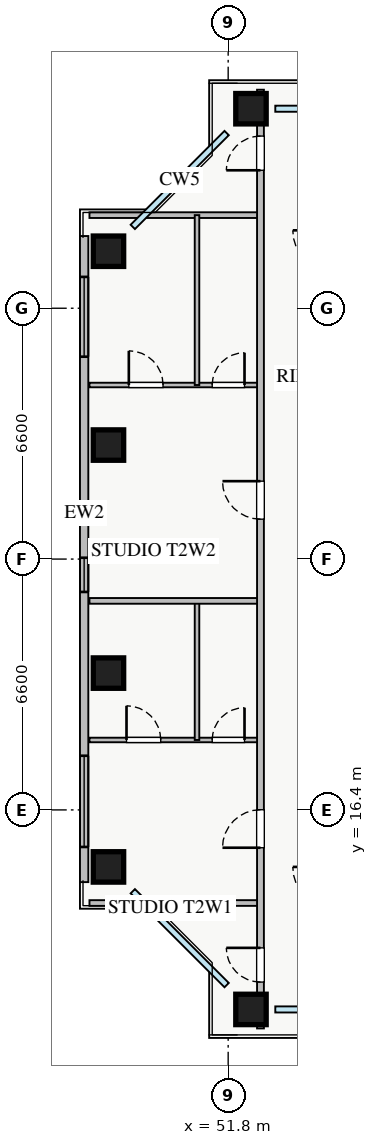
"""IFC4 building model, lengths in metres.
Left out: names, types, materials, properties, quantities, classifications, styles, units other than length and angle.
Written with IfcOpenShell. Run it as: python <this file> out.ifc"""

import sys

from ifc_helpers import new_model, si_unit, direction, frame, frame_2d, origin, origin_2d, place, context, subcontext, project, spatial, rectangle, extrude, source, transform, mapped, element, fill, save


model = new_model("IFC4")
c1 = context("Model", 3, precision=1e-05, world=origin(), true_north=direction((0.0, 1.0)))
c2 = subcontext(c1, "Body", "Model", "MODEL_VIEW")
j1 = project(units=[si_unit("LENGTHUNIT", "METRE"), si_unit("PLANEANGLEUNIT", "RADIAN")], contexts=[c1])
p1 = place(None, origin())
s1 = spatial("IfcSite", under=j1, at=p1, CompositionType="ELEMENT")
p2 = place(p1, origin())
s2 = spatial("IfcBuilding", under=s1, at=p2, CompositionType="ELEMENT")
p3 = place(p2, frame((0.0, 0.0, 82.75)))
s3 = spatial("IfcBuildingStorey", under=s2, at=p3, CompositionType="ELEMENT", Elevation=82.75)
m1 = source(origin(), c2, "Body", "SweptSolid", [
    extrude(rectangle(XDim=0.8, YDim=0.8, at=origin_2d()), origin(), (0.0, 0.0, 1.0), 3.25),
])
for number, where, z_axis, x_axis in (
    (1, (52.4, 11.15, 0.0), (0.0, 0.0, 1.0), (1.0, 0.0, 0.0)),
    (2, (52.4, 34.85, 0.0), (0.0, 0.0, 1.0), (1.0, 0.0, 0.0)),
    (3, (48.65, 14.9, 0.0), (0.0, 0.0, 1.0), (1.0, 0.0, 0.0)),
    (4, (48.65, 20.0, 0.0), (0.0, 0.0, 1.0), (1.0, 0.0, 0.0)),
    (5, (48.65, 26.0, 0.0), (0.0, 0.0, 1.0), (1.0, 0.0, 0.0)),
    (6, (48.65, 31.1, 0.0), (0.0, 0.0, 1.0), (1.0, 0.0, 0.0)),
):
    element("IfcColumn", number, at=place(p3, frame(where, z_axis=z_axis, x_axis=x_axis)), inside=s3, PredefinedType="COLUMN", context=c2, shape_type="MappedRepresentation", body=[
        mapped(m1, transform((0.0, 0.0, 0.0), x_axis=(1.0, 0.0, 0.0), y_axis=(0.0, 1.0, 0.0), z_axis=(0.0, 0.0, 1.0), scale=1.0)),
    ])
p4 = place(p3, frame((48.01, 14.5, 0.0), z_axis=(0.0, 0.0, 1.0), x_axis=(0.0, 1.0, 0.0)))
e7 = element("IfcWall", 7, at=p4, inside=s3, PredefinedType="STANDARD", context=c2, shape_type="SweptSolid", body=[
    extrude(rectangle(XDim=17.0, YDim=0.22, at=frame_2d((8.5, 0.0))), origin(), (0.0, 0.0, 1.0), 2.61),
])
p5 = place(p4, frame((0.925, 0.0, 0.9)))
e8 = element("IfcOpeningElement", 8, at=p5, cuts=e7, PredefinedType="OPENING", context=c2, shape_type="SweptSolid", body=[
    extrude(rectangle(XDim=2.4, YDim=1.48, at=frame_2d((1.2, 0.74))), frame((0.0, 0.12, 0.0), z_axis=(0.0, -1.0, 0.0), x_axis=(1.0, 0.0, 0.0)), (0.0, 0.0, 1.0), 0.24),
])
p6 = place(p4, frame((13.825, 0.0, 0.9)))
e9 = element("IfcOpeningElement", 9, at=p6, cuts=e7, PredefinedType="OPENING", context=c2, shape_type="SweptSolid", body=[
    extrude(rectangle(XDim=2.1, YDim=1.48, at=frame_2d((1.05, 0.74))), frame((0.0, 0.12, 0.0), z_axis=(0.0, -1.0, 0.0), x_axis=(1.0, 0.0, 0.0)), (0.0, 0.0, 1.0), 0.24),
])
p7 = place(p4, frame((7.635, 0.0, 0.9)))
e10 = element("IfcOpeningElement", 10, at=p7, cuts=e7, PredefinedType="OPENING", context=c2, shape_type="SweptSolid", body=[
    extrude(rectangle(XDim=0.9, YDim=1.2, at=frame_2d((0.45, 0.6))), frame((0.0, 0.12, 0.0), z_axis=(0.0, -1.0, 0.0), x_axis=(1.0, 0.0, 0.0)), (0.0, 0.0, 1.0), 0.24),
])
for number, where, z_axis, x_axis in (
    (11, (48.15, 32.05, 0.0), (0.0, 0.0, 1.0), (1.0, 0.0, 0.0)),
    (12, (48.15, 13.95, 0.0), (0.0, 0.0, 1.0), (1.0, 0.0, 0.0)),
):
    element("IfcWall", number, at=place(p3, frame(where, z_axis=z_axis, x_axis=x_axis)), inside=s3, PredefinedType="PARTITIONING", context=c2, shape_type="SweptSolid", body=[
        extrude(rectangle(XDim=4.5, YDim=0.15, at=frame_2d((2.25, 0.0))), origin(), (0.0, 0.0, 1.0), 3.07),
    ])
p8 = place(p3, frame((48.15, 18.24, 0.0), z_axis=(0.0, 0.0, 1.0), x_axis=(1.0, 0.0, 0.0)))
e13 = element("IfcWall", 13, at=p8, inside=s3, PredefinedType="PLUMBINGWALL", context=c2, shape_type="SweptSolid", body=[
    extrude(rectangle(XDim=4.5, YDim=0.12, at=frame_2d((2.25, 0.0))), origin(), (0.0, 0.0, 1.0), 3.07),
])
p9 = place(p8, frame((0.975, 0.0, 0.0)))
e14 = element("IfcOpeningElement", 14, at=p9, cuts=e13, PredefinedType="OPENING", context=c2, shape_type="SweptSolid", body=[
    extrude(rectangle(XDim=0.9, YDim=2.05, at=frame_2d((0.45, 1.025))), frame((0.0, 0.07, 0.0), z_axis=(0.0, -1.0, 0.0), x_axis=(1.0, 0.0, 0.0)), (0.0, 0.0, 1.0), 0.14),
])
p10 = place(p8, frame((3.23, 0.0, 0.0)))
e15 = element("IfcOpeningElement", 15, at=p10, cuts=e13, PredefinedType="OPENING", context=c2, shape_type="SweptSolid", body=[
    extrude(rectangle(XDim=0.85, YDim=2.05, at=frame_2d((0.425, 1.025))), frame((0.0, 0.07, 0.0), z_axis=(0.0, -1.0, 0.0), x_axis=(1.0, 0.0, 0.0)), (0.0, 0.0, 1.0), 0.14),
])
p11 = place(p3, frame((50.98, 18.24, 0.0), z_axis=(0.0, 0.0, 1.0), x_axis=(0.0, 1.0, 0.0)))
e16 = element("IfcWall", 16, at=p11, inside=s3, PredefinedType="PLUMBINGWALL", context=c2, shape_type="SweptSolid", body=[
    extrude(rectangle(XDim=3.66, YDim=0.12, at=frame_2d((1.83, 0.0))), origin(), (0.0, 0.0, 1.0), 3.07),
])
p12 = place(p3, frame((48.15, 27.58, 0.0), z_axis=(0.0, 0.0, 1.0), x_axis=(1.0, 0.0, 0.0)))
e17 = element("IfcWall", 17, at=p12, inside=s3, PredefinedType="PLUMBINGWALL", context=c2, shape_type="SweptSolid", body=[
    extrude(rectangle(XDim=4.5, YDim=0.12, at=frame_2d((2.25, 0.0))), origin(), (0.0, 0.0, 1.0), 2.771),
])
p13 = place(p12, frame((1.036, 0.0, 0.0)))
e18 = element("IfcOpeningElement", 18, at=p13, cuts=e17, PredefinedType="OPENING", context=c2, shape_type="SweptSolid", body=[
    extrude(rectangle(XDim=0.9, YDim=2.05, at=frame_2d((0.45, 1.025))), frame((0.0, 0.07, 0.0), z_axis=(0.0, -1.0, 0.0), x_axis=(1.0, 0.0, 0.0)), (0.0, 0.0, 1.0), 0.14),
])
p14 = place(p12, frame((3.23, 0.0, 0.0)))
e19 = element("IfcOpeningElement", 19, at=p14, cuts=e17, PredefinedType="OPENING", context=c2, shape_type="SweptSolid", body=[
    extrude(rectangle(XDim=0.85, YDim=2.05, at=frame_2d((0.425, 1.025))), frame((0.0, 0.07, 0.0), z_axis=(0.0, -1.0, 0.0), x_axis=(1.0, 0.0, 0.0)), (0.0, 0.0, 1.0), 0.14),
])
p15 = place(p3, frame((50.98, 27.58, 0.0), z_axis=(0.0, 0.0, 1.0), x_axis=(0.0, 1.0, 0.0)))
e20 = element("IfcWall", 20, at=p15, inside=s3, PredefinedType="PLUMBINGWALL", context=c2, shape_type="SweptSolid", body=[
    extrude(rectangle(XDim=4.47, YDim=0.12, at=frame_2d((2.235, 0.0))), origin(), (0.0, 0.0, 1.0), 3.07),
])
p16 = place(p3, frame((48.15, 21.9, 0.0), z_axis=(0.0, 0.0, 1.0), x_axis=(1.0, 0.0, 0.0)))
e21 = element("IfcWall", 21, at=p16, inside=s3, PredefinedType="PARTITIONING", context=c2, shape_type="SweptSolid", body=[
    extrude(rectangle(XDim=4.5, YDim=0.15, at=frame_2d((2.25, 0.0))), origin(), (0.0, 0.0, 1.0), 3.07),
])
p17 = place(p3, frame((52.65, 10.65, 0.0), z_axis=(0.0, 0.0, 1.0), x_axis=(0.0, 1.0, 0.0)))
e22 = element("IfcWall", 22, at=p17, inside=s3, PredefinedType="PARTITIONING", context=c2, shape_type="SweptSolid", body=[
    extrude(rectangle(XDim=24.7, YDim=0.18, at=frame_2d((12.35, 0.0))), origin(), (0.0, 0.0, 1.0), 2.615),
])
p18 = place(p17, frame((22.58, 0.0, 0.0)))
e23 = element("IfcOpeningElement", 23, at=p18, cuts=e22, PredefinedType="OPENING", context=c2, shape_type="SweptSolid", body=[
    extrude(rectangle(XDim=0.9, YDim=2.05, at=frame_2d((0.45, 1.025))), frame((0.0, 0.1, 0.0), z_axis=(0.0, -1.0, 0.0), x_axis=(1.0, 0.0, 0.0)), (0.0, 0.0, 1.0), 0.2),
])
p19 = place(p17, frame((1.22, 0.0, 0.0)))
e24 = element("IfcOpeningElement", 24, at=p19, cuts=e22, PredefinedType="OPENING", context=c2, shape_type="SweptSolid", body=[
    extrude(rectangle(XDim=0.9, YDim=2.05, at=frame_2d((0.45, 1.025))), frame((0.0, 0.1, 0.0), z_axis=(0.0, -1.0, 0.0), x_axis=(1.0, 0.0, 0.0)), (0.0, 0.0, 1.0), 0.2),
])
p20 = place(p17, frame((4.755, 0.0, 0.0)))
e25 = element("IfcOpeningElement", 25, at=p20, cuts=e22, PredefinedType="OPENING", context=c2, shape_type="SweptSolid", body=[
    extrude(rectangle(XDim=1.0, YDim=2.05, at=frame_2d((0.5, 1.025))), frame((0.0, 0.1, 0.0), z_axis=(0.0, -1.0, 0.0), x_axis=(1.0, 0.0, 0.0)), (0.0, 0.0, 1.0), 0.2),
])
p21 = place(p17, frame((13.4, 0.0, 0.0)))
e26 = element("IfcOpeningElement", 26, at=p21, cuts=e22, PredefinedType="OPENING", context=c2, shape_type="SweptSolid", body=[
    extrude(rectangle(XDim=1.0, YDim=2.05, at=frame_2d((0.5, 1.025))), frame((0.0, 0.1, 0.0), z_axis=(0.0, -1.0, 0.0), x_axis=(1.0, 0.0, 0.0)), (0.0, 0.0, 1.0), 0.2),
])
m2 = source(origin(), c2, "Body", "SweptSolid", [
    extrude(rectangle(XDim=2.4, YDim=1.48, at=frame_2d((1.2, 0.74))), frame((0.0, 0.03, 0.0), z_axis=(0.0, -1.0, 0.0), x_axis=(1.0, 0.0, 0.0)), (0.0, 0.0, 1.0), 0.06),
])
p22 = place(p5, origin())
e27 = element("IfcWindow", 27, at=p22, inside=s3, PartitioningType="TRIPLE_PANEL_VERTICAL", PredefinedType="WINDOW", context=c2, shape_type="MappedRepresentation", body=[
    mapped(m2, transform((0.0, 0.0, 0.0), x_axis=(1.0, 0.0, 0.0), y_axis=(0.0, 1.0, 0.0), z_axis=(0.0, 0.0, 1.0), scale=1.0)),
])
fill(e8, e27)
m3 = source(origin(), c2, "Body", "SweptSolid", [
    extrude(rectangle(XDim=2.1, YDim=1.48, at=frame_2d((1.05, 0.74))), frame((0.0, 0.03, 0.0), z_axis=(0.0, -1.0, 0.0), x_axis=(1.0, 0.0, 0.0)), (0.0, 0.0, 1.0), 0.06),
])
p23 = place(p6, origin())
e28 = element("IfcWindow", 28, at=p23, inside=s3, PartitioningType="TRIPLE_PANEL_VERTICAL", PredefinedType="WINDOW", context=c2, shape_type="MappedRepresentation", body=[
    mapped(m3, transform((0.0, 0.0, 0.0), x_axis=(1.0, 0.0, 0.0), y_axis=(0.0, 1.0, 0.0), z_axis=(0.0, 0.0, 1.0), scale=1.0)),
])
fill(e9, e28)
m4 = source(origin(), c2, "Body", "SweptSolid", [
    extrude(rectangle(XDim=0.9, YDim=2.05, at=frame_2d((0.45, 1.025))), frame((0.0, 0.025, 0.0), z_axis=(0.0, -1.0, 0.0), x_axis=(1.0, 0.0, 0.0)), (0.0, 0.0, 1.0), 0.05),
])
p24 = place(p9, origin())
e29 = element("IfcDoor", 29, at=p24, inside=s3, OperationType="SINGLE_SWING_LEFT", PredefinedType="DOOR", context=c2, shape_type="MappedRepresentation", body=[
    mapped(m4, transform((0.0, 0.0, 0.0), x_axis=(1.0, 0.0, 0.0), y_axis=(0.0, 1.0, 0.0), z_axis=(0.0, 0.0, 1.0), scale=1.0)),
])
fill(e14, e29)
m5 = source(origin(), c2, "Body", "SweptSolid", [
    extrude(rectangle(XDim=0.85, YDim=2.05, at=frame_2d((0.425, 1.025))), frame((0.0, 0.025, 0.0), z_axis=(0.0, -1.0, 0.0), x_axis=(1.0, 0.0, 0.0)), (0.0, 0.0, 1.0), 0.05),
])
p25 = place(p10, origin())
e30 = element("IfcDoor", 30, at=p25, inside=s3, OperationType="SINGLE_SWING_RIGHT", PredefinedType="DOOR", context=c2, shape_type="MappedRepresentation", body=[
    mapped(m5, transform((0.0, 0.0, 0.0), x_axis=(1.0, 0.0, 0.0), y_axis=(0.0, 1.0, 0.0), z_axis=(0.0, 0.0, 1.0), scale=1.0)),
])
fill(e15, e30)
p26 = place(p13, origin())
e31 = element("IfcDoor", 31, at=p26, inside=s3, OperationType="SINGLE_SWING_LEFT", PredefinedType="DOOR", context=c2, shape_type="MappedRepresentation", body=[
    mapped(m4, transform((0.0, 0.0, 0.0), x_axis=(1.0, 0.0, 0.0), y_axis=(0.0, 1.0, 0.0), z_axis=(0.0, 0.0, 1.0), scale=1.0)),
])
fill(e18, e31)
p27 = place(p14, origin())
e32 = element("IfcDoor", 32, at=p27, inside=s3, OperationType="SINGLE_SWING_RIGHT", PredefinedType="DOOR", context=c2, shape_type="MappedRepresentation", body=[
    mapped(m5, transform((0.0, 0.0, 0.0), x_axis=(1.0, 0.0, 0.0), y_axis=(0.0, 1.0, 0.0), z_axis=(0.0, 0.0, 1.0), scale=1.0)),
])
fill(e19, e32)
p28 = place(p18, origin())
e33 = element("IfcDoor", 33, at=p28, inside=s3, OperationType="SINGLE_SWING_LEFT", PredefinedType="DOOR", context=c2, shape_type="MappedRepresentation", body=[
    mapped(m4, transform((0.0, 0.0, 0.0), x_axis=(1.0, 0.0, 0.0), y_axis=(0.0, 1.0, 0.0), z_axis=(0.0, 0.0, 1.0), scale=1.0)),
])
fill(e23, e33)
p29 = place(p19, origin())
e34 = element("IfcDoor", 34, at=p29, inside=s3, OperationType="SINGLE_SWING_RIGHT", PredefinedType="DOOR", context=c2, shape_type="MappedRepresentation", body=[
    mapped(m4, transform((0.0, 0.0, 0.0), x_axis=(1.0, 0.0, 0.0), y_axis=(0.0, 1.0, 0.0), z_axis=(0.0, 0.0, 1.0), scale=1.0)),
])
fill(e24, e34)
m6 = source(origin(), c2, "Body", "SweptSolid", [
    extrude(rectangle(XDim=1.0, YDim=2.05, at=frame_2d((0.5, 1.025))), frame((0.0, 0.025, 0.0), z_axis=(0.0, -1.0, 0.0), x_axis=(1.0, 0.0, 0.0)), (0.0, 0.0, 1.0), 0.05),
])
p30 = place(p20, origin())
e35 = element("IfcDoor", 35, at=p30, inside=s3, OperationType="SINGLE_SWING_LEFT", PredefinedType="DOOR", context=c2, shape_type="MappedRepresentation", body=[
    mapped(m6, transform((0.0, 0.0, 0.0), x_axis=(1.0, 0.0, 0.0), y_axis=(0.0, 1.0, 0.0), z_axis=(0.0, 0.0, 1.0), scale=1.0)),
])
fill(e25, e35)
p31 = place(p21, origin())
e36 = element("IfcDoor", 36, at=p31, inside=s3, OperationType="SINGLE_SWING_RIGHT", PredefinedType="DOOR", context=c2, shape_type="MappedRepresentation", body=[
    mapped(m6, transform((0.0, 0.0, 0.0), x_axis=(1.0, 0.0, 0.0), y_axis=(0.0, 1.0, 0.0), z_axis=(0.0, 0.0, 1.0), scale=1.0)),
])
fill(e26, e36)
m7 = source(origin(), c2, "Body", "SweptSolid", [
    extrude(rectangle(XDim=0.9, YDim=1.2, at=frame_2d((0.45, 0.6))), frame((0.0, 0.03, 0.0), z_axis=(0.0, -1.0, 0.0), x_axis=(1.0, 0.0, 0.0)), (0.0, 0.0, 1.0), 0.06),
])
p32 = place(p7, origin())
e37 = element("IfcWindow", 37, at=p32, inside=s3, PartitioningType="SINGLE_PANEL", PredefinedType="WINDOW", context=c2, shape_type="MappedRepresentation", body=[
    mapped(m7, transform((0.0, 0.0, 0.0), x_axis=(1.0, 0.0, 0.0), y_axis=(0.0, 1.0, 0.0), z_axis=(0.0, 0.0, 1.0), scale=1.0)),
])
fill(e10, e37)
save(model, sys.argv[1])
